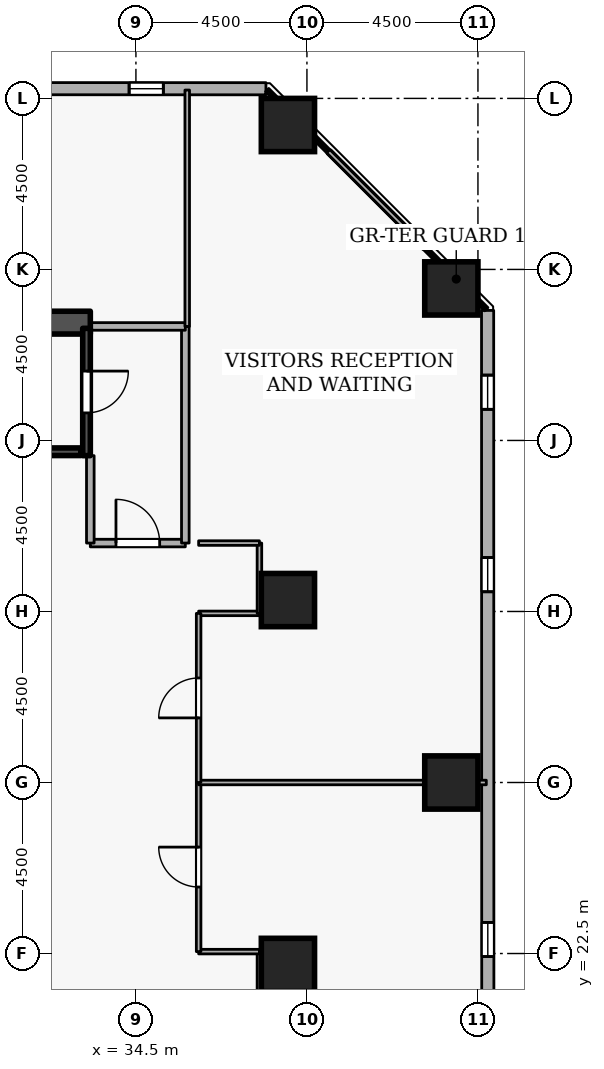
"""IFC4 building model, lengths in metres.
Left out: names, types, materials, properties, quantities, classifications, styles, units other than length and angle.
Written with IfcOpenShell. Run it as: python <this file> out.ifc"""

import sys

from ifc_helpers import new_model, si_unit, direction, frame, frame_2d, origin, origin_2d, place, context, subcontext, project, spatial, rectangle, extrude, element, fill, save


model = new_model("IFC4")
c1 = context("Model", 3, precision=1e-05, world=origin(), true_north=direction((0.0, 1.0)))
c2 = subcontext(c1, "Body", "Model", "MODEL_VIEW")
j1 = project(units=[si_unit("LENGTHUNIT", "METRE"), si_unit("PLANEANGLEUNIT", "RADIAN")], contexts=[c1])
p1 = place(None, origin())
s1 = spatial("IfcSite", under=j1, at=p1, CompositionType="ELEMENT")
p2 = place(p1, origin())
s2 = spatial("IfcBuilding", under=s1, at=p2, CompositionType="ELEMENT")
p3 = place(p2, frame((0.0, 0.0, 31.5)))
s3 = spatial("IfcBuildingStorey", under=s2, at=p3, CompositionType="ELEMENT", Elevation=31.5)
p4 = place(p3, frame((17.7, 39.1, 0.0), z_axis=(0.0, 0.0, 1.0), x_axis=(1.0, 0.0, 0.0)))
e1 = element("IfcWall", 1, at=p4, inside=s3, PredefinedType="SHEAR", context=c2, shape_type="SweptSolid", body=[
    extrude(rectangle(XDim=15.6, YDim=0.6, at=frame_2d((7.8, 0.0))), origin(), (0.0, 0.0, 1.0), 3.6),
])
for number, where, z_axis, x_axis in (
    (2, (42.8, 27.0, 0.0), (0.0, 0.0, 1.0), (1.0, 0.0, 0.0)),
    (3, (42.8, 40.0, 0.0), (0.0, 0.0, 1.0), (1.0, 0.0, 0.0)),
    (4, (38.5, 44.3, 0.0), (0.0, 0.0, 1.0), (1.0, 0.0, 0.0)),
    (5, (38.5, 22.2, 0.0), (0.0, 0.0, 1.0), (1.0, 0.0, 0.0)),
    (6, (38.5, 31.8, 0.0), (0.0, 0.0, 1.0), (1.0, 0.0, 0.0)),
):
    element("IfcColumn", number, at=place(p3, frame(where, z_axis=z_axis, x_axis=x_axis)), inside=s3, PredefinedType="COLUMN", context=c2, shape_type="SweptSolid", body=[
        extrude(rectangle(XDim=1.4, YDim=1.4, at=origin_2d()), origin(), (0.0, 0.0, 1.0), 3.6),
    ])
p5 = place(p3, frame((43.765, 5.319, 0.0), z_axis=(0.0, 0.0, 1.0), x_axis=(-0.000307837676, 0.999999952618, 0.0)))
e7 = element("IfcWall", 7, at=p5, inside=s3, PredefinedType="STANDARD", context=c2, shape_type="SweptSolid", body=[
    extrude(rectangle(XDim=34.103, YDim=0.32, at=frame_2d((17.051, 0.0))), origin(), (0.0, 0.0, 1.0), 2.7),
])
p6 = place(p5, frame((2.7, 0.0, 0.72)))
e8 = element("IfcOpeningElement", 8, at=p6, cuts=e7, PredefinedType="OPENING", context=c2, shape_type="SweptSolid", body=[
    extrude(rectangle(XDim=0.9, YDim=1.75, at=frame_2d((0.45, 0.875))), frame((0.0, 0.17, 0.0), z_axis=(0.0, -1.0, 0.0), x_axis=(1.0, 0.0, 0.0)), (0.0, 0.0, 1.0), 0.34),
])
p7 = place(p5, frame((12.3, 0.0, 0.72)))
e9 = element("IfcOpeningElement", 9, at=p7, cuts=e7, PredefinedType="OPENING", context=c2, shape_type="SweptSolid", body=[
    extrude(rectangle(XDim=0.9, YDim=1.75, at=frame_2d((0.45, 0.875))), frame((0.0, 0.17, 0.0), z_axis=(0.0, -1.0, 0.0), x_axis=(1.0, 0.0, 0.0)), (0.0, 0.0, 1.0), 0.34),
])
p8 = place(p5, frame((17.1, 0.0, 0.72)))
e10 = element("IfcOpeningElement", 10, at=p8, cuts=e7, PredefinedType="OPENING", context=c2, shape_type="SweptSolid", body=[
    extrude(rectangle(XDim=0.9, YDim=1.75, at=frame_2d((0.45, 0.875))), frame((0.0, 0.17, 0.0), z_axis=(0.0, -1.0, 0.0), x_axis=(1.0, 0.0, 0.0)), (0.0, 0.0, 1.0), 0.34),
])
p9 = place(p5, frame((26.7, 0.0, 0.72)))
e11 = element("IfcOpeningElement", 11, at=p9, cuts=e7, PredefinedType="OPENING", context=c2, shape_type="SweptSolid", body=[
    extrude(rectangle(XDim=0.9, YDim=1.75, at=frame_2d((0.45, 0.875))), frame((0.0, 0.17, 0.0), z_axis=(0.0, -1.0, 0.0), x_axis=(1.0, 0.0, 0.0)), (0.0, 0.0, 1.0), 0.34),
])
p10 = place(p5, frame((31.5, 0.0, 0.72)))
e12 = element("IfcOpeningElement", 12, at=p10, cuts=e7, PredefinedType="OPENING", context=c2, shape_type="SweptSolid", body=[
    extrude(rectangle(XDim=0.9, YDim=1.75, at=frame_2d((0.45, 0.875))), frame((0.0, 0.17, 0.0), z_axis=(0.0, -1.0, 0.0), x_axis=(1.0, 0.0, 0.0)), (0.0, 0.0, 1.0), 0.34),
])
p11 = place(p3, frame((37.921, 45.254, 0.0), z_axis=(0.0, 0.0, 1.0), x_axis=(-0.999999952618, 0.000307837676, 0.0)))
e13 = element("IfcWall", 13, at=p11, inside=s3, PredefinedType="STANDARD", context=c2, shape_type="SweptSolid", body=[
    extrude(rectangle(XDim=34.103, YDim=0.32, at=frame_2d((17.051, 0.0))), origin(), (0.0, 0.0, 1.0), 2.7),
])
p12 = place(p11, frame((2.7, 0.0, 0.72)))
e14 = element("IfcOpeningElement", 14, at=p12, cuts=e13, PredefinedType="OPENING", context=c2, shape_type="SweptSolid", body=[
    extrude(rectangle(XDim=0.9, YDim=1.75, at=frame_2d((0.45, 0.875))), frame((0.0, 0.17, 0.0), z_axis=(0.0, -1.0, 0.0), x_axis=(1.0, 0.0, 0.0)), (0.0, 0.0, 1.0), 0.34),
])
p13 = place(p11, frame((7.5, 0.0, 0.72)))
e15 = element("IfcOpeningElement", 15, at=p13, cuts=e13, PredefinedType="OPENING", context=c2, shape_type="SweptSolid", body=[
    extrude(rectangle(XDim=0.9, YDim=1.75, at=frame_2d((0.45, 0.875))), frame((0.0, 0.17, 0.0), z_axis=(0.0, -1.0, 0.0), x_axis=(1.0, 0.0, 0.0)), (0.0, 0.0, 1.0), 0.34),
])
p14 = place(p11, frame((17.1, 0.0, 0.72)))
e16 = element("IfcOpeningElement", 16, at=p14, cuts=e13, PredefinedType="OPENING", context=c2, shape_type="SweptSolid", body=[
    extrude(rectangle(XDim=0.9, YDim=1.75, at=frame_2d((0.45, 0.875))), frame((0.0, 0.17, 0.0), z_axis=(0.0, -1.0, 0.0), x_axis=(1.0, 0.0, 0.0)), (0.0, 0.0, 1.0), 0.34),
])
p15 = place(p11, frame((21.9, 0.0, 0.72)))
e17 = element("IfcOpeningElement", 17, at=p15, cuts=e13, PredefinedType="OPENING", context=c2, shape_type="SweptSolid", body=[
    extrude(rectangle(XDim=0.9, YDim=1.75, at=frame_2d((0.45, 0.875))), frame((0.0, 0.17, 0.0), z_axis=(0.0, -1.0, 0.0), x_axis=(1.0, 0.0, 0.0)), (0.0, 0.0, 1.0), 0.34),
])
p16 = place(p11, frame((31.5, 0.0, 0.72)))
e18 = element("IfcOpeningElement", 18, at=p16, cuts=e13, PredefinedType="OPENING", context=c2, shape_type="SweptSolid", body=[
    extrude(rectangle(XDim=0.9, YDim=1.75, at=frame_2d((0.45, 0.875))), frame((0.0, 0.17, 0.0), z_axis=(0.0, -1.0, 0.0), x_axis=(1.0, 0.0, 0.0)), (0.0, 0.0, 1.0), 0.34),
])
p17 = place(p3, frame((33.2, 38.95, 0.0), z_axis=(0.0, 0.0, 1.0), x_axis=(0.0, -1.0, 0.0)))
e19 = element("IfcWall", 19, at=p17, inside=s3, PredefinedType="SHEAR", context=c2, shape_type="SweptSolid", body=[
    extrude(rectangle(XDim=3.35, YDim=0.2, at=frame_2d((1.675, 0.0))), origin(), (0.0, 0.0, 1.0), 3.6),
])
p18 = place(p17, frame((1.125, 0.0, 0.0)))
e20 = element("IfcOpeningElement", 20, at=p18, cuts=e19, PredefinedType="OPENING", context=c2, shape_type="SweptSolid", body=[
    extrude(rectangle(XDim=1.1, YDim=2.1, at=frame_2d((0.55, 1.05))), frame((0.0, 0.11, 0.0), z_axis=(0.0, -1.0, 0.0), x_axis=(1.0, 0.0, 0.0)), (0.0, 0.0, 1.0), 0.22),
])
p19 = place(p3, frame((25.95, 35.703, 0.0), z_axis=(0.0, 0.0, 1.0), x_axis=(1.0, 0.0, 0.0)))
e21 = element("IfcWall", 21, at=p19, inside=s3, PredefinedType="SHEAR", context=c2, shape_type="SweptSolid", body=[
    extrude(rectangle(XDim=7.1, YDim=0.2, at=frame_2d((3.55, 0.0))), origin(), (0.0, 0.0, 1.0), 3.6),
])
p20 = place(p3, frame((33.3, 33.3, 0.0), z_axis=(0.0, 0.0, 1.0), x_axis=(1.0, 0.0, 0.0)))
e22 = element("IfcWall", 22, at=p20, inside=s3, PredefinedType="STANDARD", context=c2, shape_type="SweptSolid", body=[
    extrude(rectangle(XDim=2.5, YDim=0.2, at=frame_2d((1.25, 0.0))), origin(), (0.0, 0.0, 1.0), 3.34),
])
p21 = place(p20, frame((0.675, 0.0, 0.0)))
e23 = element("IfcOpeningElement", 23, at=p21, cuts=e22, PredefinedType="OPENING", context=c2, shape_type="SweptSolid", body=[
    extrude(rectangle(XDim=1.15, YDim=2.1, at=frame_2d((0.575, 1.05))), frame((0.0, 0.11, 0.0), z_axis=(0.0, -1.0, 0.0), x_axis=(1.0, 0.0, 0.0)), (0.0, 0.0, 1.0), 0.22),
])
p22 = place(p3, frame((35.8, 33.3, 0.0), z_axis=(0.0, 0.0, 1.0), x_axis=(0.0, 1.0, 0.0)))
e24 = element("IfcWall", 24, at=p22, inside=s3, PredefinedType="STANDARD", context=c2, shape_type="SweptSolid", body=[
    extrude(rectangle(XDim=5.7, YDim=0.2, at=frame_2d((2.85, 0.0))), origin(), (0.0, 0.0, 1.0), 3.34),
])
p23 = place(p3, frame((35.8, 39.0, 0.0), z_axis=(0.0, 0.0, 1.0), x_axis=(-1.0, 0.0, 0.0)))
e25 = element("IfcWall", 25, at=p23, inside=s3, PredefinedType="STANDARD", context=c2, shape_type="SweptSolid", body=[
    extrude(rectangle(XDim=2.5, YDim=0.2, at=frame_2d((1.25, 0.0))), origin(), (0.0, 0.0, 1.0), 3.34),
])
p24 = place(p3, frame((33.3, 35.6, 0.0), z_axis=(0.0, 0.0, 1.0), x_axis=(0.0, -1.0, 0.0)))
e26 = element("IfcWall", 26, at=p24, inside=s3, PredefinedType="STANDARD", context=c2, shape_type="SweptSolid", body=[
    extrude(rectangle(XDim=2.3, YDim=0.2, at=frame_2d((1.15, 0.0))), origin(), (0.0, 0.0, 1.0), 2.545),
])
p25 = place(p3, frame((37.75, 20.7, 0.0), z_axis=(0.0, 0.0, 1.0), x_axis=(0.0, 1.0, 0.0)))
e27 = element("IfcWall", 27, at=p25, inside=s3, PredefinedType="PARTITIONING", context=c2, shape_type="SweptSolid", body=[
    extrude(rectangle(XDim=1.85, YDim=0.12, at=frame_2d((0.925, 0.0))), origin(), (0.0, 0.0, 1.0), 3.34),
])
p26 = place(p3, frame((37.75, 22.55, 0.0), z_axis=(0.0, 0.0, 1.0), x_axis=(-1.0, 0.0, 0.0)))
e28 = element("IfcWall", 28, at=p26, inside=s3, PredefinedType="PARTITIONING", context=c2, shape_type="SweptSolid", body=[
    extrude(rectangle(XDim=1.6, YDim=0.12, at=frame_2d((0.8, 0.0))), origin(), (0.0, 0.0, 1.0), 3.34),
])
p27 = place(p3, frame((36.15, 22.55, 0.0), z_axis=(0.0, 0.0, 1.0), x_axis=(0.0, 1.0, 0.0)))
e29 = element("IfcWall", 29, at=p27, inside=s3, PredefinedType="PARTITIONING", context=c2, shape_type="SweptSolid", body=[
    extrude(rectangle(XDim=4.45, YDim=0.12, at=frame_2d((2.225, 0.0))), origin(), (0.0, 0.0, 1.0), 3.34),
])
p28 = place(p27, frame((1.7, 0.0, 0.0)))
e30 = element("IfcOpeningElement", 30, at=p28, cuts=e29, PredefinedType="OPENING", context=c2, shape_type="SweptSolid", body=[
    extrude(rectangle(XDim=1.05, YDim=2.1, at=frame_2d((0.525, 1.05))), frame((0.0, 0.07, 0.0), z_axis=(0.0, -1.0, 0.0), x_axis=(1.0, 0.0, 0.0)), (0.0, 0.0, 1.0), 0.14),
])
p29 = place(p3, frame((36.15, 27.0, 0.0), z_axis=(0.0, 0.0, 1.0), x_axis=(1.0, 0.0, 0.0)))
e31 = element("IfcWall", 31, at=p29, inside=s3, PredefinedType="PARTITIONING", context=c2, shape_type="SweptSolid", body=[
    extrude(rectangle(XDim=7.57, YDim=0.12, at=frame_2d((3.785, 0.0))), origin(), (0.0, 0.0, 1.0), 2.878),
])
p30 = place(p3, frame((36.15, 31.45, 0.0), z_axis=(0.0, 0.0, 1.0), x_axis=(1.0, 0.0, 0.0)))
e32 = element("IfcWall", 32, at=p30, inside=s3, PredefinedType="PARTITIONING", context=c2, shape_type="SweptSolid", body=[
    extrude(rectangle(XDim=1.6, YDim=0.12, at=frame_2d((0.8, 0.0))), origin(), (0.0, 0.0, 1.0), 3.34),
])
p31 = place(p3, frame((37.75, 31.45, 0.0), z_axis=(0.0, 0.0, 1.0), x_axis=(0.0, 1.0, 0.0)))
e33 = element("IfcWall", 33, at=p31, inside=s3, PredefinedType="PARTITIONING", context=c2, shape_type="SweptSolid", body=[
    extrude(rectangle(XDim=1.85, YDim=0.12, at=frame_2d((0.925, 0.0))), origin(), (0.0, 0.0, 1.0), 3.34),
])
p32 = place(p3, frame((37.75, 33.3, 0.0), z_axis=(0.0, 0.0, 1.0), x_axis=(-1.0, 0.0, 0.0)))
e34 = element("IfcWall", 34, at=p32, inside=s3, PredefinedType="PARTITIONING", context=c2, shape_type="SweptSolid", body=[
    extrude(rectangle(XDim=1.6, YDim=0.12, at=frame_2d((0.8, 0.0))), origin(), (0.0, 0.0, 1.0), 3.34),
])
p33 = place(p3, frame((35.85, 39.0, 0.0), z_axis=(0.0, 0.0, 1.0), x_axis=(0.0, 1.0, 0.0)))
e35 = element("IfcWall", 35, at=p33, inside=s3, PredefinedType="PARTITIONING", context=c2, shape_type="SweptSolid", body=[
    extrude(rectangle(XDim=6.22, YDim=0.12, at=frame_2d((3.11, 0.0))), origin(), (0.0, 0.0, 1.0), 3.34),
])
p34 = place(p3, frame((37.952, 45.22, 0.0), z_axis=(0.0, 0.0, 1.0), x_axis=(0.707106781187, -0.707106781187, 0.0)))
e36 = element("IfcWall", 36, at=p34, inside=s3, PredefinedType="PARTITIONING", context=c2, shape_type="SweptSolid", body=[
    extrude(rectangle(XDim=8.156, YDim=0.12, at=frame_2d((4.078, 0.0))), origin(), (0.0, 0.0, 1.0), 3.34),
])
p35 = place(p3, frame((36.15, 27.0, 0.0), z_axis=(0.0, 0.0, 1.0), x_axis=(0.0, 1.0, 0.0)))
e37 = element("IfcWall", 37, at=p35, inside=s3, PredefinedType="PARTITIONING", context=c2, shape_type="SweptSolid", body=[
    extrude(rectangle(XDim=4.45, YDim=0.12, at=frame_2d((2.225, 0.0))), origin(), (0.0, 0.0, 1.0), 3.34),
])
p36 = place(p35, frame((1.7, 0.0, 0.0)))
e38 = element("IfcOpeningElement", 38, at=p36, cuts=e37, PredefinedType="OPENING", context=c2, shape_type="SweptSolid", body=[
    extrude(rectangle(XDim=1.05, YDim=2.1, at=frame_2d((0.525, 1.05))), frame((0.0, 0.07, 0.0), z_axis=(0.0, -1.0, 0.0), x_axis=(1.0, 0.0, 0.0)), (0.0, 0.0, 1.0), 0.14),
])
p37 = place(p8, origin())
e39 = element("IfcWindow", 39, at=p37, inside=s3, PartitioningType="SINGLE_PANEL", PredefinedType="WINDOW", context=c2, shape_type="SweptSolid", body=[
    extrude(rectangle(XDim=0.9, YDim=1.75, at=frame_2d((0.45, 0.875))), frame((0.0, 0.03, 0.0), z_axis=(0.0, -1.0, 0.0), x_axis=(1.0, 0.0, 0.0)), (0.0, 0.0, 1.0), 0.06),
])
fill(e10, e39)
p38 = place(p9, origin())
e40 = element("IfcWindow", 40, at=p38, inside=s3, PartitioningType="SINGLE_PANEL", PredefinedType="WINDOW", context=c2, shape_type="SweptSolid", body=[
    extrude(rectangle(XDim=0.9, YDim=1.75, at=frame_2d((0.45, 0.875))), frame((0.0, 0.03, 0.0), z_axis=(0.0, -1.0, 0.0), x_axis=(1.0, 0.0, 0.0)), (0.0, 0.0, 1.0), 0.06),
])
fill(e11, e40)
p39 = place(p10, origin())
e41 = element("IfcWindow", 41, at=p39, inside=s3, PartitioningType="SINGLE_PANEL", PredefinedType="WINDOW", context=c2, shape_type="SweptSolid", body=[
    extrude(rectangle(XDim=0.9, YDim=1.75, at=frame_2d((0.45, 0.875))), frame((0.0, 0.03, 0.0), z_axis=(0.0, -1.0, 0.0), x_axis=(1.0, 0.0, 0.0)), (0.0, 0.0, 1.0), 0.06),
])
fill(e12, e41)
p40 = place(p12, origin())
e42 = element("IfcWindow", 42, at=p40, inside=s3, PartitioningType="SINGLE_PANEL", PredefinedType="WINDOW", context=c2, shape_type="SweptSolid", body=[
    extrude(rectangle(XDim=0.9, YDim=1.75, at=frame_2d((0.45, 0.875))), frame((0.0, 0.03, 0.0), z_axis=(0.0, -1.0, 0.0), x_axis=(1.0, 0.0, 0.0)), (0.0, 0.0, 1.0), 0.06),
])
fill(e14, e42)
p41 = place(p18, origin())
e43 = element("IfcDoor", 43, at=p41, inside=s3, OperationType="SINGLE_SWING_LEFT", PredefinedType="DOOR", context=c2, shape_type="SweptSolid", body=[
    extrude(rectangle(XDim=1.1, YDim=2.1, at=frame_2d((0.55, 1.05))), frame((0.0, 0.025, 0.0), z_axis=(0.0, -1.0, 0.0), x_axis=(1.0, 0.0, 0.0)), (0.0, 0.0, 1.0), 0.05),
])
fill(e20, e43)
p42 = place(p21, origin())
e44 = element("IfcDoor", 44, at=p42, inside=s3, OperationType="SINGLE_SWING_LEFT", PredefinedType="DOOR", context=c2, shape_type="SweptSolid", body=[
    extrude(rectangle(XDim=1.15, YDim=2.1, at=frame_2d((0.575, 1.05))), frame((0.0, 0.025, 0.0), z_axis=(0.0, -1.0, 0.0), x_axis=(1.0, 0.0, 0.0)), (0.0, 0.0, 1.0), 0.05),
])
fill(e23, e44)
p43 = place(p28, origin())
e45 = element("IfcDoor", 45, at=p43, inside=s3, OperationType="SINGLE_SWING_RIGHT", PredefinedType="DOOR", context=c2, shape_type="SweptSolid", body=[
    extrude(rectangle(XDim=1.05, YDim=2.1, at=frame_2d((0.525, 1.05))), frame((0.0, 0.025, 0.0), z_axis=(0.0, -1.0, 0.0), x_axis=(1.0, 0.0, 0.0)), (0.0, 0.0, 1.0), 0.05),
])
fill(e30, e45)
p44 = place(p36, origin())
e46 = element("IfcDoor", 46, at=p44, inside=s3, OperationType="SINGLE_SWING_LEFT", PredefinedType="DOOR", context=c2, shape_type="SweptSolid", body=[
    extrude(rectangle(XDim=1.05, YDim=2.1, at=frame_2d((0.525, 1.05))), frame((0.0, 0.025, 0.0), z_axis=(0.0, -1.0, 0.0), x_axis=(1.0, 0.0, 0.0)), (0.0, 0.0, 1.0), 0.05),
])
fill(e38, e46)
save(model, sys.argv[1])
